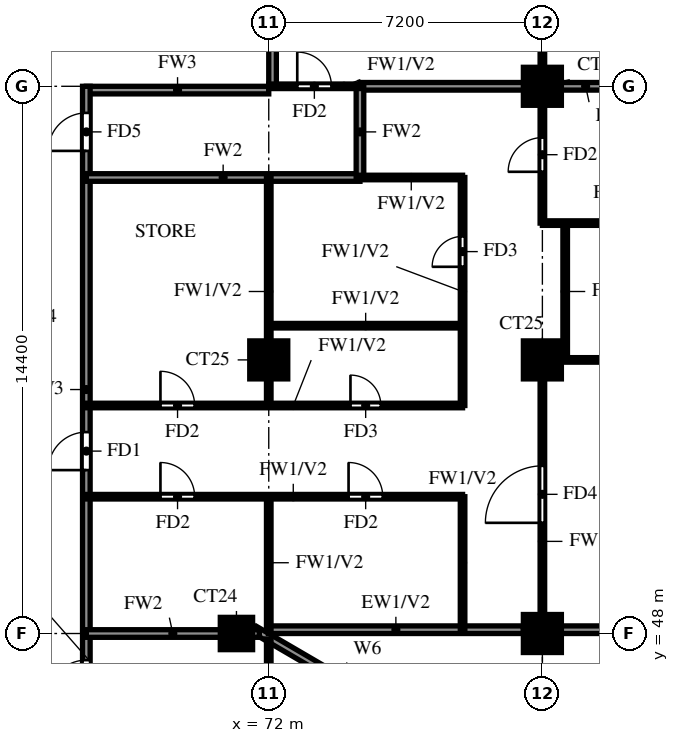
"""IFC4 building model, lengths in metres.
Left out: names, types, materials, properties, quantities, classifications, styles, units other than length and angle.
Written with IfcOpenShell. Run it as: python <this file> out.ifc"""

import sys

from ifc_helpers import new_model, si_unit, direction, frame, frame_2d, origin, origin_2d, place, context, subcontext, project, spatial, rectangle, extrude, source, transform, mapped, element, fill, save


model = new_model("IFC4")
c1 = context("Model", 3, precision=1e-05, world=origin(), true_north=direction((0.0, 1.0)))
c2 = subcontext(c1, "Body", "Model", "MODEL_VIEW")
j1 = project(units=[si_unit("LENGTHUNIT", "METRE"), si_unit("PLANEANGLEUNIT", "RADIAN")], contexts=[c1])
p1 = place(None, origin())
s1 = spatial("IfcSite", under=j1, at=p1, CompositionType="ELEMENT")
p2 = place(p1, origin())
s2 = spatial("IfcBuilding", under=s1, at=p2, CompositionType="ELEMENT")
p3 = place(p2, frame((0.0, 0.0, 167.5)))
s3 = spatial("IfcBuildingStorey", under=s2, at=p3, CompositionType="ELEMENT", Elevation=167.5)
m1 = source(origin(), c2, "Body", "SweptSolid", [
    extrude(rectangle(XDim=0.85, YDim=0.85, at=origin_2d()), origin(), (0.0, 0.0, 1.0), 3.2),
])
p4 = place(p3, frame((71.15, 48.0, 0.0), z_axis=(0.0, 0.0, 1.0), x_axis=(1.0, 0.0, 0.0)))
e1 = element("IfcColumn", 1, at=p4, inside=s3, PredefinedType="COLUMN", context=c2, shape_type="MappedRepresentation", body=[
    mapped(m1, transform((0.0, 0.0, 0.0))),
])
m2 = source(origin(), c2, "Body", "SweptSolid", [
    extrude(rectangle(XDim=1.0, YDim=1.0, at=origin_2d()), origin(), (0.0, 0.0, 1.0), 3.2),
])
for number, where, z_axis, x_axis in (
    (2, (79.2, 48.0, 0.0), (0.0, 0.0, 1.0), (1.0, 0.0, 0.0)),
    (3, (72.0, 55.2, 0.0), (0.0, 0.0, 1.0), (1.0, 0.0, 0.0)),
    (4, (79.2, 55.2, 0.0), (0.0, 0.0, 1.0), (1.0, 0.0, 0.0)),
    (5, (79.2, 62.4, 0.0), (0.0, 0.0, 1.0), (1.0, 0.0, 0.0)),
):
    element("IfcColumn", number, at=place(p3, frame(where, z_axis=z_axis, x_axis=x_axis)), inside=s3, PredefinedType="COLUMN", context=c2, shape_type="MappedRepresentation", body=[
        mapped(m2, transform((0.0, 0.0, 0.0))),
    ])
p5 = place(p3, frame((85.719, 39.881, 0.0), z_axis=(0.0, 0.0, 1.0), x_axis=(-0.86377618652, 0.503875678716, 0.0)))
e6 = element("IfcWall", 6, at=p5, inside=s3, PredefinedType="SOLIDWALL", context=c2, shape_type="SweptSolid", body=[
    extrude(rectangle(XDim=16.311, YDim=0.2, at=frame_2d((8.156, 0.0))), origin(), (0.0, 0.0, 1.0), 3.2),
])
p6 = place(p5, frame((13.326, 0.0, 1.5)))
e7 = element("IfcOpeningElement", 7, at=p6, cuts=e6, PredefinedType="OPENING", context=c2, shape_type="SweptSolid", body=[
    extrude(rectangle(XDim=0.9, YDim=0.9, at=frame_2d((0.45, 0.45))), frame((0.0, 0.11, 0.0), z_axis=(0.0, -1.0, 0.0), x_axis=(1.0, 0.0, 0.0)), (0.0, 0.0, 1.0), 0.22),
])
p7 = place(p3, frame((71.99, 48.1, 0.0), z_axis=(0.0, 0.0, 1.0), x_axis=(1.0, 0.0, 0.0)))
e8 = element("IfcWall", 8, at=p7, inside=s3, PredefinedType="SOLIDWALL", context=c2, shape_type="SweptSolid", body=[
    extrude(rectangle(XDim=6.71, YDim=0.2, at=frame_2d((3.355, 0.0))), origin(), (0.0, 0.0, 1.0), 3.2),
])
p8 = place(p3, frame((79.7, 48.1, 0.0), z_axis=(0.0, 0.0, 1.0), x_axis=(1.0, 0.0, 0.0)))
e9 = element("IfcWall", 9, at=p8, inside=s3, PredefinedType="SOLIDWALL", context=c2, shape_type="SweptSolid", body=[
    extrude(rectangle(XDim=5.675, YDim=0.2, at=frame_2d((2.837, 0.0))), origin(), (0.0, 0.0, 1.0), 3.2),
])
p9 = place(p8, frame((1.637, 0.0, 0.6)))
e10 = element("IfcOpeningElement", 10, at=p9, cuts=e9, PredefinedType="OPENING", context=c2, shape_type="SweptSolid", body=[
    extrude(rectangle(XDim=2.4, YDim=2.4, at=frame_2d((1.2, 1.2))), frame((0.0, 0.11, 0.0), z_axis=(0.0, -1.0, 0.0), x_axis=(1.0, 0.0, 0.0)), (0.0, 0.0, 1.0), 0.22),
])
p10 = place(p3, frame((67.2, 62.3, 0.0), z_axis=(0.0, 0.0, 1.0), x_axis=(1.0, 0.0, 0.0)))
e11 = element("IfcWall", 11, at=p10, inside=s3, PredefinedType="SOLIDWALL", context=c2, shape_type="SweptSolid", body=[
    extrude(rectangle(XDim=4.8, YDim=0.2, at=frame_2d((2.4, 0.0))), origin(), (0.0, 0.0, 1.0), 3.2),
])
p11 = place(p3, frame((67.2, 45.6, 0.0), z_axis=(0.0, 0.0, 1.0), x_axis=(0.0, 1.0, 0.0)))
e12 = element("IfcWall", 12, at=p11, inside=s3, PredefinedType="SOLIDWALL", context=c2, shape_type="SweptSolid", body=[
    extrude(rectangle(XDim=16.8, YDim=0.2, at=frame_2d((8.4, 0.0))), origin(), (0.0, 0.0, 1.0), 3.2),
])
p12 = place(p11, frame((6.7, 0.0, 0.0)))
e13 = element("IfcOpeningElement", 13, at=p12, cuts=e12, PredefinedType="OPENING", context=c2, shape_type="SweptSolid", body=[
    extrude(rectangle(XDim=1.0, YDim=2.1, at=frame_2d((0.5, 1.05))), frame((0.0, 0.11, 0.0), z_axis=(0.0, -1.0, 0.0), x_axis=(1.0, 0.0, 0.0)), (0.0, 0.0, 1.0), 0.22),
])
p13 = place(p11, frame((15.1, 0.0, 0.0)))
e14 = element("IfcOpeningElement", 14, at=p13, cuts=e12, PredefinedType="OPENING", context=c2, shape_type="SweptSolid", body=[
    extrude(rectangle(XDim=1.0, YDim=2.1, at=frame_2d((0.5, 1.05))), frame((0.0, 0.11, 0.0), z_axis=(0.0, -1.0, 0.0), x_axis=(1.0, 0.0, 0.0)), (0.0, 0.0, 1.0), 0.22),
])
p14 = place(p11, frame((0.7, 0.0, 0.0)))
e15 = element("IfcOpeningElement", 15, at=p14, cuts=e12, PredefinedType="OPENING", context=c2, shape_type="SweptSolid", body=[
    extrude(rectangle(XDim=1.0, YDim=2.1, at=frame_2d((0.5, 1.05))), frame((0.0, 0.11, 0.0), z_axis=(0.0, -1.0, 0.0), x_axis=(1.0, 0.0, 0.0)), (0.0, 0.0, 1.0), 0.22),
])
p15 = place(p3, frame((72.1, 62.4, 0.0), z_axis=(0.0, 0.0, 1.0), x_axis=(0.0, 1.0, 0.0)))
e16 = element("IfcWall", 16, at=p15, inside=s3, PredefinedType="SOLIDWALL", context=c2, shape_type="SweptSolid", body=[
    extrude(rectangle(XDim=15.6, YDim=0.2, at=frame_2d((7.8, 0.0))), origin(), (0.0, 0.0, 1.0), 3.2),
])
p16 = place(p3, frame((67.2, 48.0, 0.0), z_axis=(0.0, 0.0, 1.0), x_axis=(1.0, 0.0, 0.0)))
e17 = element("IfcWall", 17, at=p16, inside=s3, PredefinedType="SOLIDWALL", context=c2, shape_type="SweptSolid", body=[
    extrude(rectangle(XDim=4.552, YDim=0.2, at=frame_2d((2.276, 0.0))), origin(), (0.0, 0.0, 1.0), 3.2),
])
p17 = place(p3, frame((67.2, 60.0, 0.0), z_axis=(0.0, 0.0, 1.0), x_axis=(1.0, 0.0, 0.0)))
e18 = element("IfcWall", 18, at=p17, inside=s3, PredefinedType="SOLIDWALL", context=c2, shape_type="SweptSolid", body=[
    extrude(rectangle(XDim=7.2, YDim=0.2, at=frame_2d((3.6, 0.0))), origin(), (0.0, 0.0, 1.0), 3.2),
])
p18 = place(p3, frame((74.4, 62.4, 0.0), z_axis=(0.0, 0.0, 1.0), x_axis=(1.0, 0.0, 0.0)))
e19 = element("IfcWall", 19, at=p18, inside=s3, PredefinedType="SOLIDWALL", context=c2, shape_type="SweptSolid", body=[
    extrude(rectangle(XDim=11.875, YDim=0.2, at=frame_2d((5.938, 0.0))), origin(), (0.0, 0.0, 1.0), 3.2),
])
p19 = place(p3, frame((74.4, 60.0, 0.0), z_axis=(0.0, 0.0, 1.0), x_axis=(0.0, 1.0, 0.0)))
e20 = element("IfcWall", 20, at=p19, inside=s3, PredefinedType="SOLIDWALL", context=c2, shape_type="SweptSolid", body=[
    extrude(rectangle(XDim=2.4, YDim=0.2, at=frame_2d((1.2, 0.0))), origin(), (0.0, 0.0, 1.0), 3.2),
])
p20 = place(p3, frame((67.2, 51.6, 0.0), z_axis=(0.0, 0.0, 1.0), x_axis=(1.0, 0.0, 0.0)))
e21 = element("IfcWall", 21, at=p20, inside=s3, PredefinedType="PARTITIONING", context=c2, shape_type="SweptSolid", body=[
    extrude(rectangle(XDim=9.9, YDim=0.12, at=frame_2d((4.95, 0.0))), origin(), (0.0, 0.0, 1.0), 3.2),
])
p21 = place(p20, frame((6.9, 0.0, 0.0)))
e22 = element("IfcOpeningElement", 22, at=p21, cuts=e21, PredefinedType="OPENING", context=c2, shape_type="SweptSolid", body=[
    extrude(rectangle(XDim=0.9, YDim=2.1, at=frame_2d((0.45, 1.05))), frame((0.0, 0.07, 0.0), z_axis=(0.0, -1.0, 0.0), x_axis=(1.0, 0.0, 0.0)), (0.0, 0.0, 1.0), 0.14),
])
p22 = place(p20, frame((1.95, 0.0, 0.0)))
e23 = element("IfcOpeningElement", 23, at=p22, cuts=e21, PredefinedType="OPENING", context=c2, shape_type="SweptSolid", body=[
    extrude(rectangle(XDim=0.9, YDim=2.1, at=frame_2d((0.45, 1.05))), frame((0.0, 0.07, 0.0), z_axis=(0.0, -1.0, 0.0), x_axis=(1.0, 0.0, 0.0)), (0.0, 0.0, 1.0), 0.14),
])
p23 = place(p3, frame((67.2, 54.0, 0.0), z_axis=(0.0, 0.0, 1.0), x_axis=(1.0, 0.0, 0.0)))
e24 = element("IfcWall", 24, at=p23, inside=s3, PredefinedType="PARTITIONING", context=c2, shape_type="SweptSolid", body=[
    extrude(rectangle(XDim=9.9, YDim=0.12, at=frame_2d((4.95, 0.0))), origin(), (0.0, 0.0, 1.0), 3.2),
])
p24 = place(p23, frame((6.95, 0.0, 0.0)))
e25 = element("IfcOpeningElement", 25, at=p24, cuts=e24, PredefinedType="OPENING", context=c2, shape_type="SweptSolid", body=[
    extrude(rectangle(XDim=0.8, YDim=2.1, at=frame_2d((0.4, 1.05))), frame((0.0, 0.07, 0.0), z_axis=(0.0, -1.0, 0.0), x_axis=(1.0, 0.0, 0.0)), (0.0, 0.0, 1.0), 0.14),
])
p25 = place(p23, frame((1.95, 0.0, 0.0)))
e26 = element("IfcOpeningElement", 26, at=p25, cuts=e24, PredefinedType="OPENING", context=c2, shape_type="SweptSolid", body=[
    extrude(rectangle(XDim=0.9, YDim=2.1, at=frame_2d((0.45, 1.05))), frame((0.0, 0.07, 0.0), z_axis=(0.0, -1.0, 0.0), x_axis=(1.0, 0.0, 0.0)), (0.0, 0.0, 1.0), 0.14),
])
p26 = place(p3, frame((79.2, 55.2, 0.0), z_axis=(0.0, 0.0, 1.0), x_axis=(1.0, 0.0, 0.0)))
e27 = element("IfcWall", 27, at=p26, inside=s3, PredefinedType="PARTITIONING", context=c2, shape_type="SweptSolid", body=[
    extrude(rectangle(XDim=7.075, YDim=0.12, at=frame_2d((3.538, 0.0))), origin(), (0.0, 0.0, 1.0), 3.2),
])
p27 = place(p3, frame((72.0, 56.1, 0.0), z_axis=(0.0, 0.0, 1.0), x_axis=(1.0, 0.0, 0.0)))
e28 = element("IfcWall", 28, at=p27, inside=s3, PredefinedType="PARTITIONING", context=c2, shape_type="SweptSolid", body=[
    extrude(rectangle(XDim=5.1, YDim=0.12, at=frame_2d((2.55, 0.0))), origin(), (0.0, 0.0, 1.0), 3.2),
])
p28 = place(p3, frame((79.2, 58.8, 0.0), z_axis=(0.0, 0.0, 1.0), x_axis=(1.0, 0.0, 0.0)))
e29 = element("IfcWall", 29, at=p28, inside=s3, PredefinedType="PARTITIONING", context=c2, shape_type="SweptSolid", body=[
    extrude(rectangle(XDim=7.075, YDim=0.12, at=frame_2d((3.538, 0.0))), origin(), (0.0, 0.0, 1.0), 2.3),
])
p29 = place(p28, frame((3.438, 0.0, 0.0)))
e30 = element("IfcOpeningElement", 30, at=p29, cuts=e29, PredefinedType="OPENING", context=c2, shape_type="SweptSolid", body=[
    extrude(rectangle(XDim=0.8, YDim=2.1, at=frame_2d((0.4, 1.05))), frame((0.0, 0.07, 0.0), z_axis=(0.0, -1.0, 0.0), x_axis=(1.0, 0.0, 0.0)), (0.0, 0.0, 1.0), 0.14),
])
p30 = place(p3, frame((74.4, 60.0, 0.0), z_axis=(0.0, 0.0, 1.0), x_axis=(1.0, 0.0, 0.0)))
e31 = element("IfcWall", 31, at=p30, inside=s3, PredefinedType="PARTITIONING", context=c2, shape_type="SweptSolid", body=[
    extrude(rectangle(XDim=2.7, YDim=0.12, at=frame_2d((1.35, 0.0))), origin(), (0.0, 0.0, 1.0), 3.2),
])
p31 = place(p3, frame((72.0, 62.4, 0.0), z_axis=(0.0, 0.0, 1.0), x_axis=(1.0, 0.0, 0.0)))
e32 = element("IfcWall", 32, at=p31, inside=s3, PredefinedType="PARTITIONING", context=c2, shape_type="SweptSolid", body=[
    extrude(rectangle(XDim=2.4, YDim=0.12, at=frame_2d((1.2, 0.0))), origin(), (0.0, 0.0, 1.0), 3.2),
])
p32 = place(p31, frame((0.75, 0.0, 0.0)))
e33 = element("IfcOpeningElement", 33, at=p32, cuts=e32, PredefinedType="OPENING", context=c2, shape_type="SweptSolid", body=[
    extrude(rectangle(XDim=0.9, YDim=2.1, at=frame_2d((0.45, 1.05))), frame((0.0, 0.07, 0.0), z_axis=(0.0, -1.0, 0.0), x_axis=(1.0, 0.0, 0.0)), (0.0, 0.0, 1.0), 0.14),
])
p33 = place(p3, frame((72.0, 39.725, 0.0), z_axis=(0.0, 0.0, 1.0), x_axis=(0.0, 1.0, 0.0)))
e34 = element("IfcWall", 34, at=p33, inside=s3, PredefinedType="PARTITIONING", context=c2, shape_type="SweptSolid", body=[
    extrude(rectangle(XDim=8.13, YDim=0.12, at=frame_2d((4.065, 0.0))), origin(), (0.0, 0.0, 1.0), 2.3),
])
p34 = place(p33, frame((1.788, 0.0, 0.0)))
e35 = element("IfcOpeningElement", 35, at=p34, cuts=e34, PredefinedType="OPENING", context=c2, shape_type="SweptSolid", body=[
    extrude(rectangle(XDim=0.9, YDim=2.1, at=frame_2d((0.45, 1.05))), frame((0.0, 0.07, 0.0), z_axis=(0.0, -1.0, 0.0), x_axis=(1.0, 0.0, 0.0)), (0.0, 0.0, 1.0), 0.14),
])
p35 = place(p33, frame((4.575, 0.0, 0.0)))
e36 = element("IfcOpeningElement", 36, at=p35, cuts=e34, PredefinedType="OPENING", context=c2, shape_type="SweptSolid", body=[
    extrude(rectangle(XDim=0.8, YDim=2.1, at=frame_2d((0.4, 1.05))), frame((0.0, 0.07, 0.0), z_axis=(0.0, -1.0, 0.0), x_axis=(1.0, 0.0, 0.0)), (0.0, 0.0, 1.0), 0.14),
])
p36 = place(p3, frame((72.0, 48.125, 0.0), z_axis=(0.0, 0.0, 1.0), x_axis=(0.0, 1.0, 0.0)))
e37 = element("IfcWall", 37, at=p36, inside=s3, PredefinedType="PARTITIONING", context=c2, shape_type="SweptSolid", body=[
    extrude(rectangle(XDim=3.475, YDim=0.12, at=frame_2d((1.738, 0.0))), origin(), (0.0, 0.0, 1.0), 3.2),
])
p37 = place(p3, frame((72.0, 54.0, 0.0), z_axis=(0.0, 0.0, 1.0), x_axis=(0.0, 1.0, 0.0)))
e38 = element("IfcWall", 38, at=p37, inside=s3, PredefinedType="PARTITIONING", context=c2, shape_type="SweptSolid", body=[
    extrude(rectangle(XDim=6.0, YDim=0.12, at=frame_2d((3.0, 0.0))), origin(), (0.0, 0.0, 1.0), 3.2),
])
p38 = place(p3, frame((77.1, 48.125, 0.0), z_axis=(0.0, 0.0, 1.0), x_axis=(0.0, 1.0, 0.0)))
e39 = element("IfcWall", 39, at=p38, inside=s3, PredefinedType="PARTITIONING", context=c2, shape_type="SweptSolid", body=[
    extrude(rectangle(XDim=3.475, YDim=0.12, at=frame_2d((1.738, 0.0))), origin(), (0.0, 0.0, 1.0), 3.2),
])
p39 = place(p3, frame((77.1, 54.0, 0.0), z_axis=(0.0, 0.0, 1.0), x_axis=(0.0, 1.0, 0.0)))
e40 = element("IfcWall", 40, at=p39, inside=s3, PredefinedType="PARTITIONING", context=c2, shape_type="SweptSolid", body=[
    extrude(rectangle(XDim=6.0, YDim=0.12, at=frame_2d((3.0, 0.0))), origin(), (0.0, 0.0, 1.0), 3.2),
])
p40 = place(p39, frame((3.65, 0.0, 0.0)))
e41 = element("IfcOpeningElement", 41, at=p40, cuts=e40, PredefinedType="OPENING", context=c2, shape_type="SweptSolid", body=[
    extrude(rectangle(XDim=0.8, YDim=2.1, at=frame_2d((0.4, 1.05))), frame((0.0, 0.07, 0.0), z_axis=(0.0, -1.0, 0.0), x_axis=(1.0, 0.0, 0.0)), (0.0, 0.0, 1.0), 0.14),
])
p41 = place(p3, frame((79.2, 48.125, 0.0), z_axis=(0.0, 0.0, 1.0), x_axis=(0.0, 1.0, 0.0)))
e42 = element("IfcWall", 42, at=p41, inside=s3, PredefinedType="PARTITIONING", context=c2, shape_type="SweptSolid", body=[
    extrude(rectangle(XDim=7.075, YDim=0.12, at=frame_2d((3.538, 0.0))), origin(), (0.0, 0.0, 1.0), 3.2),
])
p42 = place(p41, frame((2.788, 0.0, 0.0)))
e43 = element("IfcOpeningElement", 43, at=p42, cuts=e42, PredefinedType="OPENING", context=c2, shape_type="SweptSolid", body=[
    extrude(rectangle(XDim=1.5, YDim=2.1, at=frame_2d((0.75, 1.05))), frame((0.0, 0.07, 0.0), z_axis=(0.0, -1.0, 0.0), x_axis=(1.0, 0.0, 0.0)), (0.0, 0.0, 1.0), 0.14),
])
p43 = place(p3, frame((79.2, 58.8, 0.0), z_axis=(0.0, 0.0, 1.0), x_axis=(0.0, 1.0, 0.0)))
e44 = element("IfcWall", 44, at=p43, inside=s3, PredefinedType="PARTITIONING", context=c2, shape_type="SweptSolid", body=[
    extrude(rectangle(XDim=10.8, YDim=0.12, at=frame_2d((5.4, 0.0))), origin(), (0.0, 0.0, 1.0), 3.2),
])
p44 = place(p43, frame((1.35, 0.0, 0.0)))
e45 = element("IfcOpeningElement", 45, at=p44, cuts=e44, PredefinedType="OPENING", context=c2, shape_type="SweptSolid", body=[
    extrude(rectangle(XDim=0.9, YDim=2.1, at=frame_2d((0.45, 1.05))), frame((0.0, 0.07, 0.0), z_axis=(0.0, -1.0, 0.0), x_axis=(1.0, 0.0, 0.0)), (0.0, 0.0, 1.0), 0.14),
])
p45 = place(p43, frame((4.95, 0.0, 0.0)))
e46 = element("IfcOpeningElement", 46, at=p45, cuts=e44, PredefinedType="OPENING", context=c2, shape_type="SweptSolid", body=[
    extrude(rectangle(XDim=0.9, YDim=2.1, at=frame_2d((0.45, 1.05))), frame((0.0, 0.07, 0.0), z_axis=(0.0, -1.0, 0.0), x_axis=(1.0, 0.0, 0.0)), (0.0, 0.0, 1.0), 0.14),
])
p46 = place(p43, frame((8.55, 0.0, 0.0)))
e47 = element("IfcOpeningElement", 47, at=p46, cuts=e44, PredefinedType="OPENING", context=c2, shape_type="SweptSolid", body=[
    extrude(rectangle(XDim=0.9, YDim=2.1, at=frame_2d((0.45, 1.05))), frame((0.0, 0.07, 0.0), z_axis=(0.0, -1.0, 0.0), x_axis=(1.0, 0.0, 0.0)), (0.0, 0.0, 1.0), 0.14),
])
p47 = place(p3, frame((79.8, 55.2, 0.0), z_axis=(0.0, 0.0, 1.0), x_axis=(0.0, 1.0, 0.0)))
e48 = element("IfcWall", 48, at=p47, inside=s3, PredefinedType="PARTITIONING", context=c2, shape_type="SweptSolid", body=[
    extrude(rectangle(XDim=3.6, YDim=0.12, at=frame_2d((1.8, 0.0))), origin(), (0.0, 0.0, 1.0), 3.2),
])
p48 = place(p12, origin())
e49 = element("IfcDoor", 49, at=p48, inside=s3, OperationType="SINGLE_SWING_LEFT", PredefinedType="DOOR", context=c2, shape_type="SweptSolid", body=[
    extrude(rectangle(XDim=1.0, YDim=2.1, at=frame_2d((0.5, 1.05))), frame((0.0, 0.025, 0.0), z_axis=(0.0, -1.0, 0.0), x_axis=(1.0, 0.0, 0.0)), (0.0, 0.0, 1.0), 0.05),
])
fill(e13, e49)
p49 = place(p42, origin())
e50 = element("IfcDoor", 50, at=p49, inside=s3, OperationType="SINGLE_SWING_RIGHT", PredefinedType="DOOR", context=c2, shape_type="SweptSolid", body=[
    extrude(rectangle(XDim=1.5, YDim=2.1, at=frame_2d((0.75, 1.05))), frame((0.0, 0.025, 0.0), z_axis=(0.0, -1.0, 0.0), x_axis=(1.0, 0.0, 0.0)), (0.0, 0.0, 1.0), 0.05),
])
fill(e43, e50)
p50 = place(p44, origin())
e51 = element("IfcDoor", 51, at=p50, inside=s3, OperationType="SINGLE_SWING_LEFT", PredefinedType="DOOR", context=c2, shape_type="SweptSolid", body=[
    extrude(rectangle(XDim=0.9, YDim=2.1, at=frame_2d((0.45, 1.05))), frame((0.0, 0.025, 0.0), z_axis=(0.0, -1.0, 0.0), x_axis=(1.0, 0.0, 0.0)), (0.0, 0.0, 1.0), 0.05),
])
fill(e45, e51)
p51 = place(p21, origin())
e52 = element("IfcDoor", 52, at=p51, inside=s3, OperationType="SINGLE_SWING_RIGHT", PredefinedType="DOOR", context=c2, shape_type="SweptSolid", body=[
    extrude(rectangle(XDim=0.9, YDim=2.1, at=frame_2d((0.45, 1.05))), frame((0.0, 0.025, 0.0), z_axis=(0.0, -1.0, 0.0), x_axis=(1.0, 0.0, 0.0)), (0.0, 0.0, 1.0), 0.05),
])
fill(e22, e52)
p52 = place(p24, origin())
e53 = element("IfcDoor", 53, at=p52, inside=s3, OperationType="SINGLE_SWING_LEFT", PredefinedType="DOOR", context=c2, shape_type="SweptSolid", body=[
    extrude(rectangle(XDim=0.8, YDim=2.1, at=frame_2d((0.4, 1.05))), frame((0.0, 0.025, 0.0), z_axis=(0.0, -1.0, 0.0), x_axis=(1.0, 0.0, 0.0)), (0.0, 0.0, 1.0), 0.05),
])
fill(e25, e53)
p53 = place(p40, origin())
e54 = element("IfcDoor", 54, at=p53, inside=s3, OperationType="SINGLE_SWING_LEFT", PredefinedType="DOOR", context=c2, shape_type="SweptSolid", body=[
    extrude(rectangle(XDim=0.8, YDim=2.1, at=frame_2d((0.4, 1.05))), frame((0.0, 0.025, 0.0), z_axis=(0.0, -1.0, 0.0), x_axis=(1.0, 0.0, 0.0)), (0.0, 0.0, 1.0), 0.05),
])
fill(e41, e54)
p54 = place(p22, origin())
e55 = element("IfcDoor", 55, at=p54, inside=s3, OperationType="SINGLE_SWING_RIGHT", PredefinedType="DOOR", context=c2, shape_type="SweptSolid", body=[
    extrude(rectangle(XDim=0.9, YDim=2.1, at=frame_2d((0.45, 1.05))), frame((0.0, 0.025, 0.0), z_axis=(0.0, -1.0, 0.0), x_axis=(1.0, 0.0, 0.0)), (0.0, 0.0, 1.0), 0.05),
])
fill(e23, e55)
p55 = place(p25, origin())
e56 = element("IfcDoor", 56, at=p55, inside=s3, OperationType="SINGLE_SWING_LEFT", PredefinedType="DOOR", context=c2, shape_type="SweptSolid", body=[
    extrude(rectangle(XDim=0.9, YDim=2.1, at=frame_2d((0.45, 1.05))), frame((0.0, 0.025, 0.0), z_axis=(0.0, -1.0, 0.0), x_axis=(1.0, 0.0, 0.0)), (0.0, 0.0, 1.0), 0.05),
])
fill(e26, e56)
p56 = place(p32, origin())
e57 = element("IfcDoor", 57, at=p56, inside=s3, OperationType="SINGLE_SWING_LEFT", PredefinedType="DOOR", context=c2, shape_type="SweptSolid", body=[
    extrude(rectangle(XDim=0.9, YDim=2.1, at=frame_2d((0.45, 1.05))), frame((0.0, 0.025, 0.0), z_axis=(0.0, -1.0, 0.0), x_axis=(1.0, 0.0, 0.0)), (0.0, 0.0, 1.0), 0.05),
])
fill(e33, e57)
p57 = place(p13, origin())
e58 = element("IfcDoor", 58, at=p57, inside=s3, OperationType="SINGLE_SWING_LEFT", PredefinedType="DOOR", context=c2, shape_type="SweptSolid", body=[
    extrude(rectangle(XDim=1.0, YDim=2.1, at=frame_2d((0.5, 1.05))), frame((0.0, 0.025, 0.0), z_axis=(0.0, -1.0, 0.0), x_axis=(1.0, 0.0, 0.0)), (0.0, 0.0, 1.0), 0.05),
])
fill(e14, e58)
p58 = place(p14, origin())
e59 = element("IfcDoor", 59, at=p58, inside=s3, OperationType="SINGLE_SWING_LEFT", PredefinedType="DOOR", context=c2, shape_type="SweptSolid", body=[
    extrude(rectangle(XDim=1.0, YDim=2.1, at=frame_2d((0.5, 1.05))), frame((0.0, 0.025, 0.0), z_axis=(0.0, -1.0, 0.0), x_axis=(1.0, 0.0, 0.0)), (0.0, 0.0, 1.0), 0.05),
])
fill(e15, e59)
save(model, sys.argv[1])
